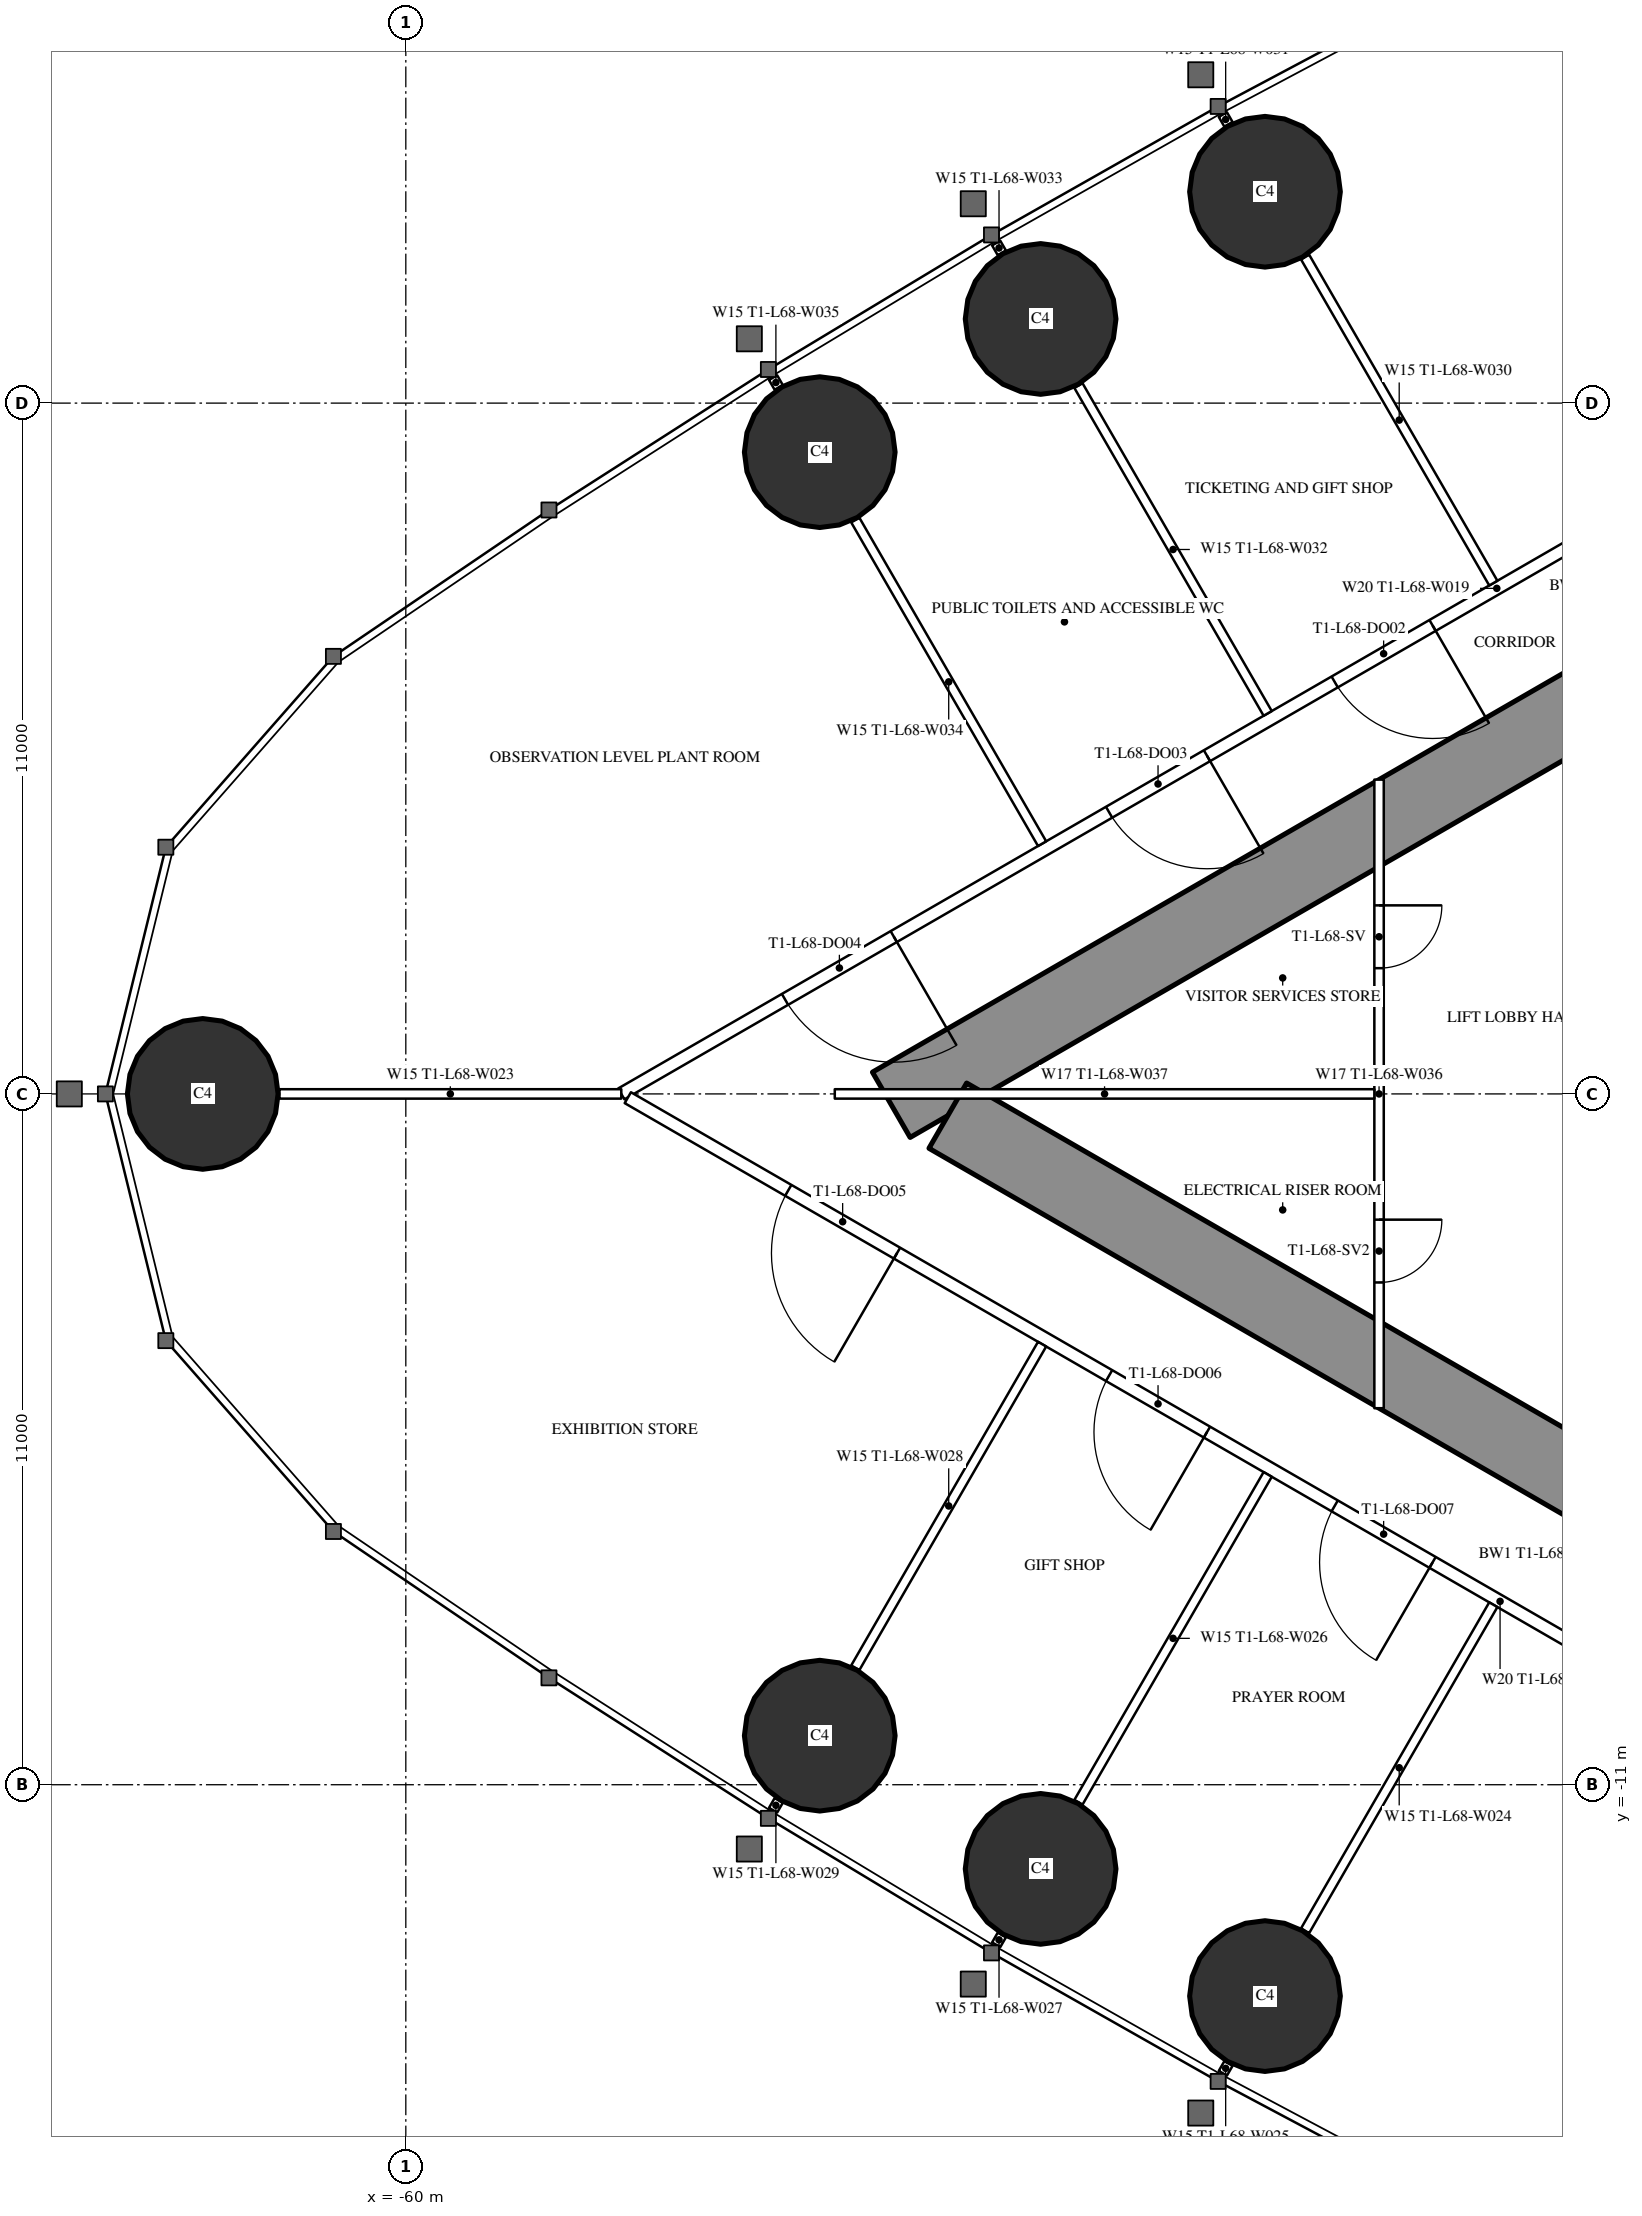
"""IFC4 building model, lengths in metres.
Left out: names, types, materials, properties, quantities, classifications, styles, units other than length and angle.
Written with IfcOpenShell. Run it as: python <this file> out.ifc"""

import sys

from ifc_helpers import new_model, si_unit, direction, frame, frame_2d, origin, origin_2d, place, context, subcontext, project, spatial, rectangle, circle, extrude, element, fill, save


model = new_model("IFC4")
c1 = context("Model", 3, precision=1e-05, world=origin(), true_north=direction((0.0, 1.0)))
c2 = subcontext(c1, "Body", "Model", "MODEL_VIEW")
j1 = project(units=[si_unit("LENGTHUNIT", "METRE"), si_unit("PLANEANGLEUNIT", "RADIAN")], contexts=[c1])
p1 = place(None, origin())
s1 = spatial("IfcSite", under=j1, at=p1, CompositionType="ELEMENT")
p2 = place(p1, origin())
s2 = spatial("IfcBuilding", under=s1, at=p2, CompositionType="ELEMENT")
p3 = place(p2, frame((0.0, 0.0, 257.3)))
s3 = spatial("IfcBuildingStorey", under=s2, at=p3, CompositionType="ELEMENT", Elevation=257.3)
for number, where, z_axis, x_axis in (
    (1, (-63.234, 0.0, 0.0), (0.0, 0.0, 1.0), (1.0, 0.0, 0.0)),
    (2, (-53.408, -10.219, 0.0), (0.0, 0.0, 1.0), (1.0, 0.0, 0.0)),
    (3, (-49.89, -12.34, 0.0), (0.0, 0.0, 1.0), (1.0, 0.0, 0.0)),
    (4, (-46.317, -14.365, 0.0), (0.0, 0.0, 1.0), (1.0, 0.0, 0.0)),
    (5, (-46.317, 14.365, 0.0), (0.0, 0.0, 1.0), (1.0, 0.0, 0.0)),
    (6, (-49.89, 12.34, 0.0), (0.0, 0.0, 1.0), (1.0, 0.0, 0.0)),
    (7, (-53.408, 10.219, 0.0), (0.0, 0.0, 1.0), (1.0, 0.0, 0.0)),
):
    element("IfcColumn", number, at=place(p3, frame(where, z_axis=z_axis, x_axis=x_axis)), inside=s3, PredefinedType="COLUMN", context=c2, shape_type="SweptSolid", body=[
        extrude(circle(Radius=1.2, at=origin_2d()), origin(), (0.0, 0.0, 1.0), 6.0),
    ])
p4 = place(p3, frame((-27.2, 14.3, 0.0), z_axis=(0.0, 0.0, 1.0), x_axis=(-0.866026593062, -0.499997940104, 0.0)))
e8 = element("IfcWall", 8, at=p4, inside=s3, PredefinedType="SHEAR", context=c2, shape_type="SweptSolid", body=[
    extrude(rectangle(XDim=28.946, YDim=1.2, at=frame_2d((14.473, 0.0))), origin(), (0.0, 0.0, 1.0), 6.0),
])
p5 = place(p4, frame((4.6, 0.0, 0.0)))
e9 = element("IfcOpeningElement", 9, at=p5, cuts=e8, PredefinedType="OPENING", context=c2, shape_type="SweptSolid", body=[
    extrude(rectangle(XDim=1.0, YDim=2.2, at=frame_2d((0.5, 1.1))), frame((0.0, 0.61, 0.0), z_axis=(0.0, -1.0, 0.0), x_axis=(1.0, 0.0, 0.0)), (0.0, 0.0, 1.0), 1.22),
])
p6 = place(p4, frame((13.395, 0.0, 0.0)))
e10 = element("IfcOpeningElement", 10, at=p6, cuts=e8, PredefinedType="OPENING", context=c2, shape_type="SweptSolid", body=[
    extrude(rectangle(XDim=1.8, YDim=2.2, at=frame_2d((0.9, 1.1))), frame((0.0, 0.61, 0.0), z_axis=(0.0, -1.0, 0.0), x_axis=(1.0, 0.0, 0.0)), (0.0, 0.0, 1.0), 1.22),
])
p7 = place(p3, frame((-27.2, -14.3, 0.0), z_axis=(0.0, 0.0, 1.0), x_axis=(-0.866024021859, 0.500002393557, 0.0)))
e11 = element("IfcWall", 11, at=p7, inside=s3, PredefinedType="SHEAR", context=c2, shape_type="SweptSolid", body=[
    extrude(rectangle(XDim=27.907, YDim=1.2, at=frame_2d((13.954, 0.0))), origin(), (0.0, 0.0, 1.0), 6.0),
])
p8 = place(p7, frame((4.6, 0.0, 0.0)))
e12 = element("IfcOpeningElement", 12, at=p8, cuts=e11, PredefinedType="OPENING", context=c2, shape_type="SweptSolid", body=[
    extrude(rectangle(XDim=1.0, YDim=2.2, at=frame_2d((0.5, 1.1))), frame((0.0, 0.61, 0.0), z_axis=(0.0, -1.0, 0.0), x_axis=(1.0, 0.0, 0.0)), (0.0, 0.0, 1.0), 1.22),
])
p9 = place(p7, frame((13.395, 0.0, 0.0)))
e13 = element("IfcOpeningElement", 13, at=p9, cuts=e11, PredefinedType="OPENING", context=c2, shape_type="SweptSolid", body=[
    extrude(rectangle(XDim=1.8, YDim=2.2, at=frame_2d((0.9, 1.1))), frame((0.0, 0.61, 0.0), z_axis=(0.0, -1.0, 0.0), x_axis=(1.0, 0.0, 0.0)), (0.0, 0.0, 1.0), 1.22),
])
p10 = place(p3, frame((-28.681, 16.101, 0.0), z_axis=(0.0, 0.0, 1.0), x_axis=(-0.866024860443, -0.500000941094, 0.0)))
e14 = element("IfcWall", 14, at=p10, inside=s3, PredefinedType="PARTITIONING", context=c2, shape_type="SweptSolid", body=[
    extrude(rectangle(XDim=32.201, YDim=0.2, at=frame_2d((16.101, 0.0))), origin(), (0.0, 0.0, 1.0), 5.75),
])
p11 = place(p10, frame((7.166, 0.0, 0.0)))
e15 = element("IfcOpeningElement", 15, at=p11, cuts=e14, PredefinedType="OPENING", context=c2, shape_type="SweptSolid", body=[
    extrude(rectangle(XDim=2.0, YDim=2.4, at=frame_2d((1.0, 1.2))), frame((0.0, 0.11, 0.0), z_axis=(0.0, -1.0, 0.0), x_axis=(1.0, 0.0, 0.0)), (0.0, 0.0, 1.0), 0.22),
])
p12 = place(p10, frame((17.281, 0.0, 0.0)))
e16 = element("IfcOpeningElement", 16, at=p12, cuts=e14, PredefinedType="OPENING", context=c2, shape_type="SweptSolid", body=[
    extrude(rectangle(XDim=1.8, YDim=2.2, at=frame_2d((0.9, 1.1))), frame((0.0, 0.11, 0.0), z_axis=(0.0, -1.0, 0.0), x_axis=(1.0, 0.0, 0.0)), (0.0, 0.0, 1.0), 0.22),
])
p13 = place(p10, frame((21.43, 0.0, 0.0)))
e17 = element("IfcOpeningElement", 17, at=p13, cuts=e14, PredefinedType="OPENING", context=c2, shape_type="SweptSolid", body=[
    extrude(rectangle(XDim=1.8, YDim=2.2, at=frame_2d((0.9, 1.1))), frame((0.0, 0.11, 0.0), z_axis=(0.0, -1.0, 0.0), x_axis=(1.0, 0.0, 0.0)), (0.0, 0.0, 1.0), 0.22),
])
p14 = place(p10, frame((27.19, 0.0, 0.0)))
e18 = element("IfcOpeningElement", 18, at=p14, cuts=e14, PredefinedType="OPENING", context=c2, shape_type="SweptSolid", body=[
    extrude(rectangle(XDim=2.0, YDim=2.4, at=frame_2d((1.0, 1.2))), frame((0.0, 0.11, 0.0), z_axis=(0.0, -1.0, 0.0), x_axis=(1.0, 0.0, 0.0)), (0.0, 0.0, 1.0), 0.22),
])
p15 = place(p3, frame((-28.681, -16.101, 0.0), z_axis=(0.0, 0.0, 1.0), x_axis=(-0.86602501917, 0.50000066617, 0.0)))
e19 = element("IfcWall", 19, at=p15, inside=s3, PredefinedType="PARTITIONING", context=c2, shape_type="SweptSolid", body=[
    extrude(rectangle(XDim=32.081, YDim=0.2, at=frame_2d((16.041, 0.0))), origin(), (0.0, 0.0, 1.0), 5.75),
])
p16 = place(p15, frame((27.13, 0.0, 0.0)))
e20 = element("IfcOpeningElement", 20, at=p16, cuts=e19, PredefinedType="OPENING", context=c2, shape_type="SweptSolid", body=[
    extrude(rectangle(XDim=2.0, YDim=2.4, at=frame_2d((1.0, 1.2))), frame((0.0, 0.11, 0.0), z_axis=(0.0, -1.0, 0.0), x_axis=(1.0, 0.0, 0.0)), (0.0, 0.0, 1.0), 0.22),
])
p17 = place(p15, frame((21.43, 0.0, 0.0)))
e21 = element("IfcOpeningElement", 21, at=p17, cuts=e19, PredefinedType="OPENING", context=c2, shape_type="SweptSolid", body=[
    extrude(rectangle(XDim=1.8, YDim=2.2, at=frame_2d((0.9, 1.1))), frame((0.0, 0.11, 0.0), z_axis=(0.0, -1.0, 0.0), x_axis=(1.0, 0.0, 0.0)), (0.0, 0.0, 1.0), 0.22),
])
p18 = place(p15, frame((17.281, 0.0, 0.0)))
e22 = element("IfcOpeningElement", 22, at=p18, cuts=e19, PredefinedType="OPENING", context=c2, shape_type="SweptSolid", body=[
    extrude(rectangle(XDim=1.8, YDim=2.2, at=frame_2d((0.9, 1.1))), frame((0.0, 0.11, 0.0), z_axis=(0.0, -1.0, 0.0), x_axis=(1.0, 0.0, 0.0)), (0.0, 0.0, 1.0), 0.22),
])
p19 = place(p15, frame((7.166, 0.0, 0.0)))
e23 = element("IfcOpeningElement", 23, at=p19, cuts=e19, PredefinedType="OPENING", context=c2, shape_type="SweptSolid", body=[
    extrude(rectangle(XDim=2.0, YDim=2.4, at=frame_2d((1.0, 1.2))), frame((0.0, 0.11, 0.0), z_axis=(0.0, -1.0, 0.0), x_axis=(1.0, 0.0, 0.0)), (0.0, 0.0, 1.0), 0.22),
])
p20 = place(p3, frame((-42.68, 8.134, 0.0), z_axis=(0.0, 0.0, 1.0), x_axis=(-0.499984479505, 0.866034364361, 0.0)))
e24 = element("IfcWall", 24, at=p20, inside=s3, PredefinedType="PARTITIONING", context=c2, shape_type="SweptSolid", body=[
    extrude(rectangle(XDim=5.995, YDim=0.15, at=frame_2d((2.998, 0.0))), origin(), (0.0, 0.0, 1.0), 4.85),
])
p21 = place(p3, frame((-46.898, 15.439, 0.0), z_axis=(0.0, 0.0, 1.0), x_axis=(-0.500232303069, 0.865891241997, 0.0)))
e25 = element("IfcWall", 25, at=p21, inside=s3, PredefinedType="PARTITIONING", context=c2, shape_type="SweptSolid", body=[
    extrude(rectangle(XDim=0.18, YDim=0.15, at=frame_2d((0.09, 0.0))), origin(), (0.0, 0.0, 1.0), 4.85),
])
p22 = place(p3, frame((-46.274, 6.059, 0.0), z_axis=(0.0, 0.0, 1.0), x_axis=(-0.500020471368, 0.866013584312, 0.0)))
e26 = element("IfcWall", 26, at=p22, inside=s3, PredefinedType="PARTITIONING", context=c2, shape_type="SweptSolid", body=[
    extrude(rectangle(XDim=6.028, YDim=0.15, at=frame_2d((3.014, 0.0))), origin(), (0.0, 0.0, 1.0), 4.85),
])
p23 = place(p3, frame((-50.508, 13.392, 0.0), z_axis=(0.0, 0.0, 1.0), x_axis=(-0.499644091975, 0.866230789891, 0.0)))
e27 = element("IfcWall", 27, at=p23, inside=s3, PredefinedType="PARTITIONING", context=c2, shape_type="SweptSolid", body=[
    extrude(rectangle(XDim=0.18, YDim=0.15, at=frame_2d((0.09, 0.0))), origin(), (0.0, 0.0, 1.0), 4.85),
])
p24 = place(p3, frame((-49.866, 3.985, 0.0), z_axis=(0.0, 0.0, 1.0), x_axis=(-0.500000694566, 0.866025002776, 0.0)))
e28 = element("IfcWall", 28, at=p24, inside=s3, PredefinedType="PARTITIONING", context=c2, shape_type="SweptSolid", body=[
    extrude(rectangle(XDim=5.95, YDim=0.15, at=frame_2d((2.975, 0.0))), origin(), (0.0, 0.0, 1.0), 4.85),
])
p25 = place(p3, frame((-54.061, 11.25, 0.0), z_axis=(0.0, 0.0, 1.0), x_axis=(-0.500391173478, 0.865799441849, 0.0)))
e29 = element("IfcWall", 29, at=p25, inside=s3, PredefinedType="PARTITIONING", context=c2, shape_type="SweptSolid", body=[
    extrude(rectangle(XDim=0.179, YDim=0.15, at=frame_2d((0.089, 0.0))), origin(), (0.0, 0.0, 1.0), 4.85),
])
p26 = place(p3, frame((-42.68, -8.134, 0.0), z_axis=(0.0, 0.0, 1.0), x_axis=(-0.499984479505, -0.866034364361, 0.0)))
e30 = element("IfcWall", 30, at=p26, inside=s3, PredefinedType="PARTITIONING", context=c2, shape_type="SweptSolid", body=[
    extrude(rectangle(XDim=5.995, YDim=0.15, at=frame_2d((2.998, 0.0))), origin(), (0.0, 0.0, 1.0), 4.85),
])
p27 = place(p3, frame((-46.898, -15.439, 0.0), z_axis=(0.0, 0.0, 1.0), x_axis=(-0.500232303069, -0.865891241997, 0.0)))
e31 = element("IfcWall", 31, at=p27, inside=s3, PredefinedType="PARTITIONING", context=c2, shape_type="SweptSolid", body=[
    extrude(rectangle(XDim=0.18, YDim=0.15, at=frame_2d((0.09, 0.0))), origin(), (0.0, 0.0, 1.0), 4.85),
])
p28 = place(p3, frame((-46.274, -6.059, 0.0), z_axis=(0.0, 0.0, 1.0), x_axis=(-0.500020471368, -0.866013584312, 0.0)))
e32 = element("IfcWall", 32, at=p28, inside=s3, PredefinedType="PARTITIONING", context=c2, shape_type="SweptSolid", body=[
    extrude(rectangle(XDim=6.028, YDim=0.15, at=frame_2d((3.014, 0.0))), origin(), (0.0, 0.0, 1.0), 4.85),
])
p29 = place(p3, frame((-50.508, -13.392, 0.0), z_axis=(0.0, 0.0, 1.0), x_axis=(-0.499644091975, -0.866230789891, 0.0)))
e33 = element("IfcWall", 33, at=p29, inside=s3, PredefinedType="PARTITIONING", context=c2, shape_type="SweptSolid", body=[
    extrude(rectangle(XDim=0.18, YDim=0.15, at=frame_2d((0.09, 0.0))), origin(), (0.0, 0.0, 1.0), 4.85),
])
p30 = place(p3, frame((-49.866, -3.985, 0.0), z_axis=(0.0, 0.0, 1.0), x_axis=(-0.500000694566, -0.866025002776, 0.0)))
e34 = element("IfcWall", 34, at=p30, inside=s3, PredefinedType="PARTITIONING", context=c2, shape_type="SweptSolid", body=[
    extrude(rectangle(XDim=5.95, YDim=0.15, at=frame_2d((2.975, 0.0))), origin(), (0.0, 0.0, 1.0), 4.85),
])
p31 = place(p3, frame((-54.061, -11.25, 0.0), z_axis=(0.0, 0.0, 1.0), x_axis=(-0.500391173478, -0.865799441849, 0.0)))
e35 = element("IfcWall", 35, at=p31, inside=s3, PredefinedType="PARTITIONING", context=c2, shape_type="SweptSolid", body=[
    extrude(rectangle(XDim=0.179, YDim=0.15, at=frame_2d((0.089, 0.0))), origin(), (0.0, 0.0, 1.0), 4.85),
])
p32 = place(p3, frame((-56.568, 0.0, 0.0), z_axis=(0.0, 0.0, 1.0), x_axis=(-1.0, 0.0, 0.0)))
e36 = element("IfcWall", 36, at=p32, inside=s3, PredefinedType="PARTITIONING", context=c2, shape_type="SweptSolid", body=[
    extrude(rectangle(XDim=5.446, YDim=0.15, at=frame_2d((2.723, 0.0))), origin(), (0.0, 0.0, 1.0), 4.85),
])
p33 = place(p3, frame((-44.5, 5.005, 0.0), z_axis=(0.0, 0.0, 1.0), x_axis=(0.0, -1.0, 0.0)))
e37 = element("IfcWall", 37, at=p33, inside=s3, PredefinedType="PARTITIONING", context=c2, shape_type="SweptSolid", body=[
    extrude(rectangle(XDim=10.009, YDim=0.15, at=frame_2d((5.005, 0.0))), origin(), (0.0, 0.0, 1.0), 4.9),
])
p34 = place(p33, frame((2.002, 0.0, 0.0)))
e38 = element("IfcOpeningElement", 38, at=p34, cuts=e37, PredefinedType="OPENING", context=c2, shape_type="SweptSolid", body=[
    extrude(rectangle(XDim=1.0, YDim=2.2, at=frame_2d((0.5, 1.1))), frame((0.0, 0.085, 0.0), z_axis=(0.0, -1.0, 0.0), x_axis=(1.0, 0.0, 0.0)), (0.0, 0.0, 1.0), 0.17),
])
p35 = place(p33, frame((7.007, 0.0, 0.0)))
e39 = element("IfcOpeningElement", 39, at=p35, cuts=e37, PredefinedType="OPENING", context=c2, shape_type="SweptSolid", body=[
    extrude(rectangle(XDim=1.0, YDim=2.2, at=frame_2d((0.5, 1.1))), frame((0.0, 0.085, 0.0), z_axis=(0.0, -1.0, 0.0), x_axis=(1.0, 0.0, 0.0)), (0.0, 0.0, 1.0), 0.17),
])
p36 = place(p3, frame((-44.575, 0.0, 0.0), z_axis=(0.0, 0.0, 1.0), x_axis=(-1.0, 0.0, 0.0)))
e40 = element("IfcWall", 40, at=p36, inside=s3, PredefinedType="PARTITIONING", context=c2, shape_type="SweptSolid", body=[
    extrude(rectangle(XDim=8.593, YDim=0.15, at=frame_2d((4.297, 0.0))), origin(), (0.0, 0.0, 1.0), 4.85),
])
p37 = place(p12, origin())
e41 = element("IfcDoor", 41, at=p37, inside=s3, OperationType="DOUBLE_DOOR_SINGLE_SWING", PredefinedType="DOOR", context=c2, shape_type="SweptSolid", body=[
    extrude(rectangle(XDim=1.8, YDim=2.2, at=frame_2d((0.9, 1.1))), frame((0.0, 0.025, 0.0), z_axis=(0.0, -1.0, 0.0), x_axis=(1.0, 0.0, 0.0)), (0.0, 0.0, 1.0), 0.05),
])
fill(e16, e41)
p38 = place(p13, origin())
e42 = element("IfcDoor", 42, at=p38, inside=s3, OperationType="DOUBLE_DOOR_SINGLE_SWING", PredefinedType="DOOR", context=c2, shape_type="SweptSolid", body=[
    extrude(rectangle(XDim=1.8, YDim=2.2, at=frame_2d((0.9, 1.1))), frame((0.0, 0.025, 0.0), z_axis=(0.0, -1.0, 0.0), x_axis=(1.0, 0.0, 0.0)), (0.0, 0.0, 1.0), 0.05),
])
fill(e17, e42)
p39 = place(p14, origin())
e43 = element("IfcDoor", 43, at=p39, inside=s3, OperationType="DOUBLE_DOOR_SINGLE_SWING", PredefinedType="DOOR", context=c2, shape_type="SweptSolid", body=[
    extrude(rectangle(XDim=2.0, YDim=2.4, at=frame_2d((1.0, 1.2))), frame((0.0, 0.025, 0.0), z_axis=(0.0, -1.0, 0.0), x_axis=(1.0, 0.0, 0.0)), (0.0, 0.0, 1.0), 0.05),
])
fill(e18, e43)
p40 = place(p16, origin())
e44 = element("IfcDoor", 44, at=p40, inside=s3, OperationType="DOUBLE_DOOR_SINGLE_SWING", PredefinedType="DOOR", context=c2, shape_type="SweptSolid", body=[
    extrude(rectangle(XDim=2.0, YDim=2.4, at=frame_2d((1.0, 1.2))), frame((0.0, 0.025, 0.0), z_axis=(0.0, -1.0, 0.0), x_axis=(1.0, 0.0, 0.0)), (0.0, 0.0, 1.0), 0.05),
])
fill(e20, e44)
p41 = place(p17, origin())
e45 = element("IfcDoor", 45, at=p41, inside=s3, OperationType="DOUBLE_DOOR_SINGLE_SWING", PredefinedType="DOOR", context=c2, shape_type="SweptSolid", body=[
    extrude(rectangle(XDim=1.8, YDim=2.2, at=frame_2d((0.9, 1.1))), frame((0.0, 0.025, 0.0), z_axis=(0.0, -1.0, 0.0), x_axis=(1.0, 0.0, 0.0)), (0.0, 0.0, 1.0), 0.05),
])
fill(e21, e45)
p42 = place(p18, origin())
e46 = element("IfcDoor", 46, at=p42, inside=s3, OperationType="DOUBLE_DOOR_SINGLE_SWING", PredefinedType="DOOR", context=c2, shape_type="SweptSolid", body=[
    extrude(rectangle(XDim=1.8, YDim=2.2, at=frame_2d((0.9, 1.1))), frame((0.0, 0.025, 0.0), z_axis=(0.0, -1.0, 0.0), x_axis=(1.0, 0.0, 0.0)), (0.0, 0.0, 1.0), 0.05),
])
fill(e22, e46)
p43 = place(p34, origin())
e47 = element("IfcDoor", 47, at=p43, inside=s3, OperationType="SINGLE_SWING_LEFT", PredefinedType="DOOR", context=c2, shape_type="SweptSolid", body=[
    extrude(rectangle(XDim=1.0, YDim=2.2, at=frame_2d((0.5, 1.1))), frame((0.0, 0.025, 0.0), z_axis=(0.0, -1.0, 0.0), x_axis=(1.0, 0.0, 0.0)), (0.0, 0.0, 1.0), 0.05),
])
fill(e38, e47)
p44 = place(p35, origin())
e48 = element("IfcDoor", 48, at=p44, inside=s3, OperationType="SINGLE_SWING_LEFT", PredefinedType="DOOR", context=c2, shape_type="SweptSolid", body=[
    extrude(rectangle(XDim=1.0, YDim=2.2, at=frame_2d((0.5, 1.1))), frame((0.0, 0.025, 0.0), z_axis=(0.0, -1.0, 0.0), x_axis=(1.0, 0.0, 0.0)), (0.0, 0.0, 1.0), 0.05),
])
fill(e39, e48)
save(model, sys.argv[1])
